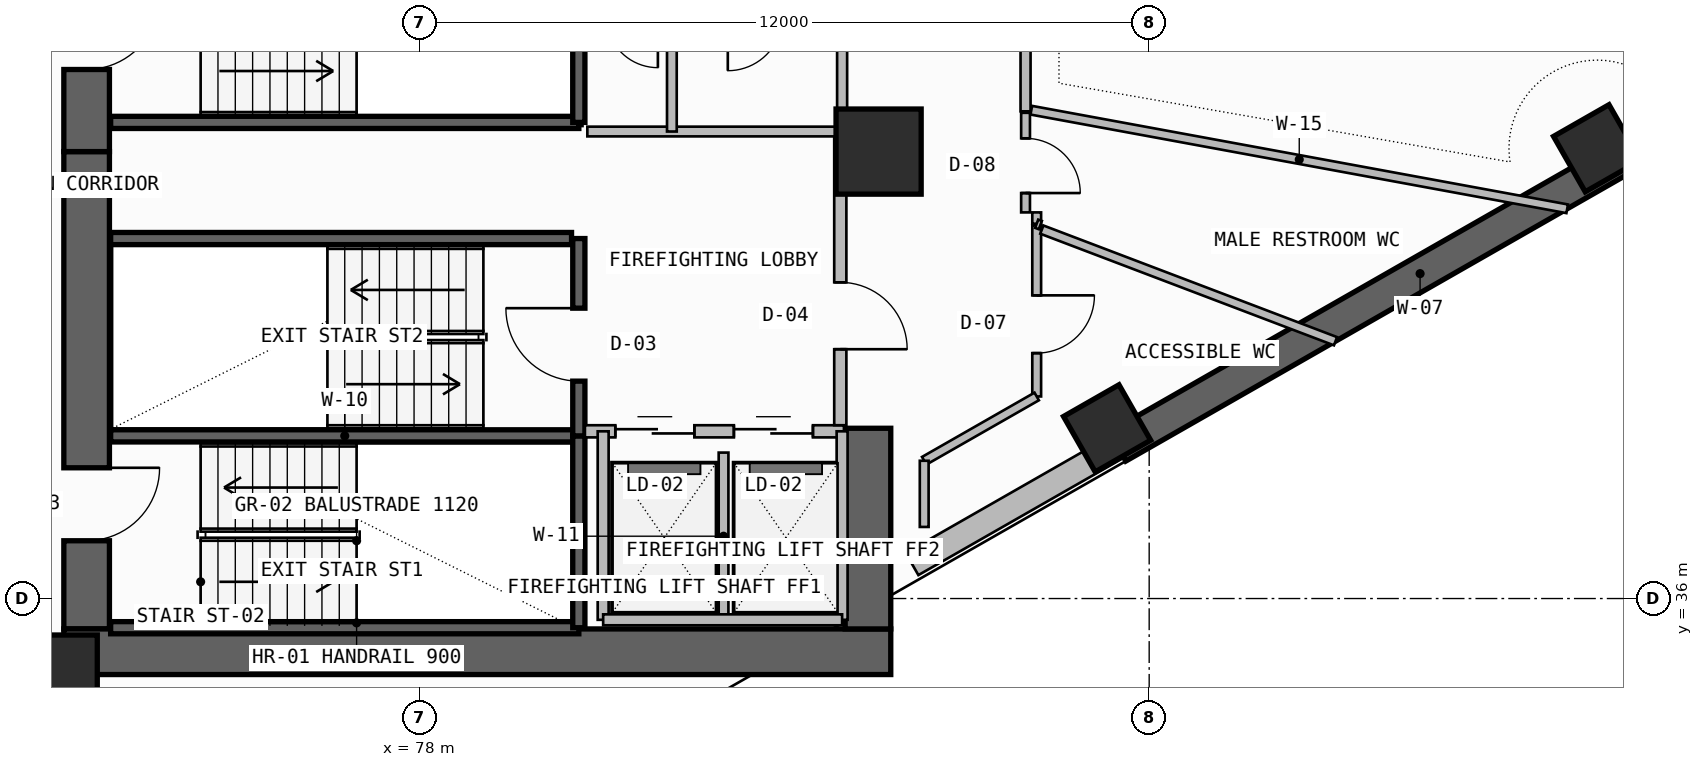
"""IFC4 building model, lengths in metres.
Left out: names, types, materials, properties, quantities, classifications, styles, units other than length and angle.
Written with IfcOpenShell. Run it as: python <this file> out.ifc"""

import sys

from ifc_helpers import new_model, si_unit, direction, frame, frame_2d, origin, origin_2d, place, context, subcontext, project, spatial, rectangle, extrude, element, fill, save


model = new_model("IFC4")
c1 = context("Model", 3, precision=1e-05, world=origin(), true_north=direction((0.0, 1.0)))
c2 = subcontext(c1, "Body", "Model", "MODEL_VIEW")
j1 = project(units=[si_unit("LENGTHUNIT", "METRE"), si_unit("PLANEANGLEUNIT", "RADIAN")], contexts=[c1])
p1 = place(None, origin())
s1 = spatial("IfcSite", under=j1, at=p1, CompositionType="ELEMENT")
p2 = place(p1, origin())
s2 = spatial("IfcBuilding", under=s1, at=p2, CompositionType="ELEMENT")
p3 = place(p2, frame((0.0, 0.0, 225.54)))
s3 = spatial("IfcBuildingStorey", under=s2, at=p3, CompositionType="ELEMENT", Elevation=225.54)
p4 = place(p3, frame((72.525, 35.5, -0.26), z_axis=(0.0, 0.0, 1.0), x_axis=(0.0, 1.0, 0.0)))
e1 = element("IfcWall", 1, at=p4, inside=s3, PredefinedType="SHEAR", context=c2, shape_type="SweptSolid", body=[
    extrude(rectangle(XDim=7.85, YDim=0.75, at=frame_2d((3.925, 0.0))), origin(), (0.0, 0.0, 1.0), 3.52),
])
p5 = place(p4, frame((1.45, 0.0, 0.26)))
e2 = element("IfcOpeningElement", 2, at=p5, cuts=e1, PredefinedType="OPENING", context=c2, shape_type="SweptSolid", body=[
    extrude(rectangle(XDim=1.2, YDim=2.2, at=frame_2d((0.6, 1.1))), frame((0.0, 0.385, 0.0), z_axis=(0.0, -1.0, 0.0), x_axis=(1.0, 0.0, 0.0)), (0.0, 0.0, 1.0), 0.77),
])
p6 = place(p3, frame((72.15, 35.125, -0.26), z_axis=(0.0, 0.0, 1.0), x_axis=(1.0, 0.0, 0.0)))
e3 = element("IfcWall", 3, at=p6, inside=s3, PredefinedType="SHEAR", context=c2, shape_type="SweptSolid", body=[
    extrude(rectangle(XDim=13.6, YDim=0.75, at=frame_2d((6.8, 0.0))), origin(), (0.0, 0.0, 1.0), 3.52),
])
p7 = place(p3, frame((85.375, 35.5, -0.26), z_axis=(0.0, 0.0, 1.0), x_axis=(0.0, 1.0, 0.0)))
e4 = element("IfcWall", 4, at=p7, inside=s3, PredefinedType="SHEAR", context=c2, shape_type="SweptSolid", body=[
    extrude(rectangle(XDim=3.3, YDim=0.75, at=frame_2d((1.65, 0.0))), origin(), (0.0, 0.0, 1.0), 3.52),
])
p8 = place(p3, frame((72.525, 43.35, -0.26), z_axis=(0.0, 0.0, 1.0), x_axis=(0.0, 1.0, 0.0)))
e5 = element("IfcWall", 5, at=p8, inside=s3, PredefinedType="SHEAR", context=c2, shape_type="SweptSolid", body=[
    extrude(rectangle(XDim=12.7, YDim=0.75, at=frame_2d((6.35, 0.0))), origin(), (0.0, 0.0, 1.0), 3.52),
])
p9 = place(p8, frame((1.35, 0.0, 0.26)))
e6 = element("IfcOpeningElement", 6, at=p9, cuts=e5, PredefinedType="OPENING", context=c2, shape_type="SweptSolid", body=[
    extrude(rectangle(XDim=1.2, YDim=2.2, at=frame_2d((0.6, 1.1))), frame((0.0, 0.385, 0.0), z_axis=(0.0, -1.0, 0.0), x_axis=(1.0, 0.0, 0.0)), (0.0, 0.0, 1.0), 0.77),
])
for number, where, z_axis, x_axis in (
    (7, (72.0, 34.7, 0.0), (0.0, 0.0, 1.0), (1.0, 0.0, 0.0)),
    (8, (85.55, 43.35, 0.0), (0.0, 0.0, 1.0), (1.0, 0.0, 0.0)),
):
    element("IfcColumn", number, at=place(p3, frame(where, z_axis=z_axis, x_axis=x_axis)), inside=s3, PredefinedType="COLUMN", context=c2, shape_type="SweptSolid", body=[
        extrude(rectangle(XDim=1.4, YDim=1.4, at=origin_2d()), origin(), (0.0, 0.0, 1.0), 3.52),
    ])
for number, where, z_axis, x_axis in (
    (9, (89.308, 38.799, 0.0), (0.0, 0.0, 1.0), (0.868, 0.496, 0.0)),
    (10, (97.367, 43.405, 0.0), (0.0, 0.0, 1.0), (0.868, 0.496, 0.0)),
):
    element("IfcColumn", number, at=place(p3, frame(where, z_axis=z_axis, x_axis=x_axis)), inside=s3, PredefinedType="COLUMN", context=c2, shape_type="SweptSolid", body=[
        extrude(rectangle(XDim=1.05, YDim=1.05, at=origin_2d()), origin(), (0.0, 0.0, 1.0), 3.52),
    ])
p10 = place(p3, frame((86.1, 36.568, 0.0), z_axis=(0.0, 0.0, 1.0), x_axis=(0.868192956745, 0.496226752461, 0.0)))
e11 = element("IfcWall", 11, at=p10, inside=s3, PredefinedType="SOLIDWALL", context=c2, shape_type="SweptSolid", body=[
    extrude(rectangle(XDim=3.892, YDim=0.42, at=frame_2d((1.946, 0.0))), origin(), (0.0, 0.0, 1.0), 2.245),
])
p11 = place(p3, frame((89.479, 38.499, -0.26), z_axis=(0.0, 0.0, 1.0), x_axis=(0.868197136736, 0.496219439123, 0.0)))
e12 = element("IfcWall", 12, at=p11, inside=s3, PredefinedType="SHEAR", context=c2, shape_type="SweptSolid", body=[
    extrude(rectangle(XDim=17.636, YDim=0.55, at=frame_2d((8.818, 0.0))), origin(), (0.0, 0.0, 1.0), 3.52),
])
p12 = place(p11, frame((11.464, 0.0, 1.1)))
e13 = element("IfcOpeningElement", 13, at=p12, cuts=e12, PredefinedType="OPENING", context=c2, shape_type="SweptSolid", body=[
    extrude(rectangle(XDim=2.4, YDim=1.2, at=frame_2d((1.2, 0.6))), frame((0.0, 0.285, 0.0), z_axis=(0.0, -1.0, 0.0), x_axis=(1.0, 0.0, 0.0)), (0.0, 0.0, 1.0), 0.57),
])
for number, where, z_axis, x_axis in (
    (14, (72.92, 35.52, -0.26), (0.0, 0.0, 1.0), (1.0, 0.0, 0.0)),
    (15, (72.92, 38.675, -0.26), (0.0, 0.0, 1.0), (1.0, 0.0, 0.0)),
):
    element("IfcWall", number, at=place(p3, frame(where, z_axis=z_axis, x_axis=x_axis)), inside=s3, PredefinedType="SOLIDWALL", context=c2, shape_type="SweptSolid", body=[
        extrude(rectangle(XDim=7.7, YDim=0.2, at=frame_2d((3.85, 0.0))), origin(), (0.0, 0.0, 1.0), 3.52),
    ])
p13 = place(p3, frame((80.62, 35.52, -0.26), z_axis=(0.0, 0.0, 1.0), x_axis=(0.0, 1.0, 0.0)))
e16 = element("IfcWall", 16, at=p13, inside=s3, PredefinedType="SOLIDWALL", context=c2, shape_type="SweptSolid", body=[
    extrude(rectangle(XDim=3.155, YDim=0.2, at=frame_2d((1.578, 0.0))), origin(), (0.0, 0.0, 1.0), 3.52),
])
p14 = place(p3, frame((80.62, 38.675, -0.26), z_axis=(0.0, 0.0, 1.0), x_axis=(0.0, 1.0, 0.0)))
e17 = element("IfcWall", 17, at=p14, inside=s3, PredefinedType="SOLIDWALL", context=c2, shape_type="SweptSolid", body=[
    extrude(rectangle(XDim=3.245, YDim=0.2, at=frame_2d((1.623, 0.0))), origin(), (0.0, 0.0, 1.0), 3.52),
])
p15 = place(p14, frame((0.9, 0.0, 0.26)))
e18 = element("IfcOpeningElement", 18, at=p15, cuts=e17, PredefinedType="OPENING", context=c2, shape_type="SweptSolid", body=[
    extrude(rectangle(XDim=1.2, YDim=2.2, at=frame_2d((0.6, 1.1))), frame((0.0, 0.11, 0.0), z_axis=(0.0, -1.0, 0.0), x_axis=(1.0, 0.0, 0.0)), (0.0, 0.0, 1.0), 0.22),
])
p16 = place(p3, frame((80.72, 38.75, 0.0), z_axis=(0.0, 0.0, 1.0), x_axis=(1.0, 0.0, 0.0)))
e19 = element("IfcWall", 19, at=p16, inside=s3, PredefinedType="SOLIDWALL", context=c2, shape_type="SweptSolid", body=[
    extrude(rectangle(XDim=4.26, YDim=0.2, at=frame_2d((2.13, 0.0))), origin(), (0.0, 0.0, 1.0), 3.26),
])
p17 = place(p16, frame((0.5, 0.0, 0.0)))
e20 = element("IfcOpeningElement", 20, at=p17, cuts=e19, PredefinedType="OPENING", context=c2, shape_type="SweptSolid", body=[
    extrude(rectangle(XDim=1.3, YDim=2.3, at=frame_2d((0.65, 1.15))), frame((0.0, 0.11, 0.0), z_axis=(0.0, -1.0, 0.0), x_axis=(1.0, 0.0, 0.0)), (0.0, 0.0, 1.0), 0.22),
])
p18 = place(p16, frame((2.45, 0.0, 0.0)))
e21 = element("IfcOpeningElement", 21, at=p18, cuts=e19, PredefinedType="OPENING", context=c2, shape_type="SweptSolid", body=[
    extrude(rectangle(XDim=1.3, YDim=2.3, at=frame_2d((0.65, 1.15))), frame((0.0, 0.11, 0.0), z_axis=(0.0, -1.0, 0.0), x_axis=(1.0, 0.0, 0.0)), (0.0, 0.0, 1.0), 0.22),
])
p19 = place(p3, frame((83.0, 35.65, 0.0), z_axis=(0.0, 0.0, 1.0), x_axis=(0.0, 1.0, 0.0)))
e22 = element("IfcWall", 22, at=p19, inside=s3, PredefinedType="PLUMBINGWALL", context=c2, shape_type="SweptSolid", body=[
    extrude(rectangle(XDim=2.75, YDim=0.16, at=frame_2d((1.375, 0.0))), origin(), (0.0, 0.0, 1.0), 3.26),
])
for number, where, z_axis, x_axis in (
    (23, (84.95, 35.65, 0.0), (0.0, 0.0, 1.0), (0.0, 1.0, 0.0)),
    (24, (81.02, 35.65, 0.0), (0.0, 0.0, 1.0), (0.0, 1.0, 0.0)),
):
    element("IfcWall", number, at=place(p3, frame(where, z_axis=z_axis, x_axis=x_axis)), inside=s3, PredefinedType="SOLIDWALL", context=c2, shape_type="SweptSolid", body=[
        extrude(rectangle(XDim=3.1, YDim=0.18, at=frame_2d((1.55, 0.0))), origin(), (0.0, 0.0, 1.0), 3.26),
    ])
p20 = place(p3, frame((81.02, 35.65, 0.0), z_axis=(0.0, 0.0, 1.0), x_axis=(1.0, 0.0, 0.0)))
e25 = element("IfcWall", 25, at=p20, inside=s3, PredefinedType="SOLIDWALL", context=c2, shape_type="SweptSolid", body=[
    extrude(rectangle(XDim=3.93, YDim=0.18, at=frame_2d((1.965, 0.0))), origin(), (0.0, 0.0, 1.0), 3.26),
])
p21 = place(p3, frame((84.92, 38.85, 0.0), z_axis=(0.0, 0.0, 1.0), x_axis=(0.0, 1.0, 0.0)))
e26 = element("IfcWall", 26, at=p21, inside=s3, PredefinedType="SOLIDWALL", context=c2, shape_type="SweptSolid", body=[
    extrude(rectangle(XDim=4.83, YDim=0.2, at=frame_2d((2.415, 0.0))), origin(), (0.0, 0.0, 1.0), 3.26),
])
p22 = place(p21, frame((1.25, 0.0, 0.0)))
e27 = element("IfcOpeningElement", 27, at=p22, cuts=e26, PredefinedType="OPENING", context=c2, shape_type="SweptSolid", body=[
    extrude(rectangle(XDim=1.1, YDim=2.2, at=frame_2d((0.55, 1.1))), frame((0.0, 0.11, 0.0), z_axis=(0.0, -1.0, 0.0), x_axis=(1.0, 0.0, 0.0)), (0.0, 0.0, 1.0), 0.22),
])
p23 = place(p3, frame((72.92, 41.92, -0.26), z_axis=(0.0, 0.0, 1.0), x_axis=(1.0, 0.0, 0.0)))
e28 = element("IfcWall", 28, at=p23, inside=s3, PredefinedType="SOLIDWALL", context=c2, shape_type="SweptSolid", body=[
    extrude(rectangle(XDim=7.58, YDim=0.2, at=frame_2d((3.79, 0.0))), origin(), (0.0, 0.0, 1.0), 3.52),
])
p24 = place(p3, frame((72.92, 43.83, -0.26), z_axis=(0.0, 0.0, 1.0), x_axis=(1.0, 0.0, 0.0)))
e29 = element("IfcWall", 29, at=p24, inside=s3, PredefinedType="SOLIDWALL", context=c2, shape_type="SweptSolid", body=[
    extrude(rectangle(XDim=7.7, YDim=0.2, at=frame_2d((3.85, 0.0))), origin(), (0.0, 0.0, 1.0), 3.52),
])
p25 = place(p3, frame((80.62, 43.83, -0.26), z_axis=(0.0, 0.0, 1.0), x_axis=(0.0, 1.0, 0.0)))
e30 = element("IfcWall", 30, at=p25, inside=s3, PredefinedType="SOLIDWALL", context=c2, shape_type="SweptSolid", body=[
    extrude(rectangle(XDim=3.24, YDim=0.2, at=frame_2d((1.62, 0.0))), origin(), (0.0, 0.0, 1.0), 3.52),
])
p26 = place(p3, frame((84.95, 43.68, 0.0), z_axis=(0.0, 0.0, 1.0), x_axis=(0.0, 1.0, 0.0)))
e31 = element("IfcWall", 31, at=p26, inside=s3, PredefinedType="PLUMBINGWALL", context=c2, shape_type="SweptSolid", body=[
    extrude(rectangle(XDim=1.9, YDim=0.165, at=frame_2d((0.95, 0.0))), origin(), (0.0, 0.0, 1.0), 3.26),
])
p27 = place(p3, frame((80.76, 43.68, 0.0), z_axis=(0.0, 0.0, 1.0), x_axis=(1.0, 0.0, 0.0)))
e32 = element("IfcWall", 32, at=p27, inside=s3, PredefinedType="PLUMBINGWALL", context=c2, shape_type="SweptSolid", body=[
    extrude(rectangle(XDim=4.19, YDim=0.16, at=frame_2d((2.095, 0.0))), origin(), (0.0, 0.0, 1.0), 3.26),
])
p28 = place(p3, frame((82.15, 43.68, 0.0), z_axis=(0.0, 0.0, 1.0), x_axis=(0.0, 1.0, 0.0)))
e33 = element("IfcWall", 33, at=p28, inside=s3, PredefinedType="PLUMBINGWALL", context=c2, shape_type="SweptSolid", body=[
    extrude(rectangle(XDim=1.9, YDim=0.16, at=frame_2d((0.95, 0.0))), origin(), (0.0, 0.0, 1.0), 3.26),
])
p29 = place(p3, frame((88.15, 39.323, 0.0), z_axis=(0.0, 0.0, 1.0), x_axis=(0.0, 1.0, 0.0)))
e34 = element("IfcWall", 34, at=p29, inside=s3, PredefinedType="PARTITIONING", context=c2, shape_type="SweptSolid", body=[
    extrude(rectangle(XDim=2.815, YDim=0.145, at=frame_2d((1.407, 0.0))), origin(), (0.0, 0.0, 1.0), 2.745),
])
p30 = place(p29, frame((0.713, 0.0, 0.0)))
e35 = element("IfcOpeningElement", 35, at=p30, cuts=e34, PredefinedType="OPENING", context=c2, shape_type="SweptSolid", body=[
    extrude(rectangle(XDim=0.95, YDim=2.15, at=frame_2d((0.475, 1.075))), frame((0.0, 0.083, 0.0), z_axis=(0.0, -1.0, 0.0), x_axis=(1.0, 0.0, 0.0)), (0.0, 0.0, 1.0), 0.165),
])
p31 = place(p3, frame((86.3, 38.266, 0.0), z_axis=(0.0, 0.0, 1.0), x_axis=(0.868179674817, 0.496249989657, 0.0)))
e36 = element("IfcWall", 36, at=p31, inside=s3, PredefinedType="PARTITIONING", context=c2, shape_type="SweptSolid", body=[
    extrude(rectangle(XDim=2.131, YDim=0.145, at=frame_2d((1.065, 0.0))), origin(), (0.0, 0.0, 1.0), 3.26),
])
p32 = place(p3, frame((88.235, 42.067, 0.0), z_axis=(0.0, 0.0, 1.0), x_axis=(0.934750944103, -0.355303634232, 0.0)))
e37 = element("IfcWall", 37, at=p32, inside=s3, PredefinedType="PARTITIONING", context=c2, shape_type="SweptSolid", body=[
    extrude(rectangle(XDim=5.167, YDim=0.145, at=frame_2d((2.583, 0.0))), origin(), (0.0, 0.0, 1.0), 2.245),
])
p33 = place(p3, frame((87.967, 44.012, 0.0), z_axis=(0.0, 0.0, 1.0), x_axis=(0.0, 1.0, 0.0)))
e38 = element("IfcWall", 38, at=p33, inside=s3, PredefinedType="PARTITIONING", context=c2, shape_type="SweptSolid", body=[
    extrude(rectangle(XDim=1.638, YDim=0.165, at=frame_2d((0.819, 0.0))), origin(), (0.0, 0.0, 1.0), 2.745),
])
p34 = place(p3, frame((96.875, 42.409, 0.0), z_axis=(0.0, 0.0, 1.0), x_axis=(-0.98349773653, 0.180920430689, 0.0)))
e39 = element("IfcWall", 39, at=p34, inside=s3, PredefinedType="PARTITIONING", context=c2, shape_type="SweptSolid", body=[
    extrude(rectangle(XDim=8.962, YDim=0.145, at=frame_2d((4.481, 0.0))), origin(), (0.0, 0.0, 1.0), 2.245),
])
p35 = place(p3, frame((87.967, 42.35, 0.0), z_axis=(0.0, 0.0, 1.0), x_axis=(0.0, 1.0, 0.0)))
e40 = element("IfcWall", 40, at=p35, inside=s3, PredefinedType="PARTITIONING", context=c2, shape_type="SweptSolid", body=[
    extrude(rectangle(XDim=1.638, YDim=0.145, at=frame_2d((0.819, 0.0))), origin(), (0.0, 0.0, 1.0), 2.745),
])
p36 = place(p35, frame((0.318, 0.0, 0.0)))
e41 = element("IfcOpeningElement", 41, at=p36, cuts=e40, PredefinedType="OPENING", context=c2, shape_type="SweptSolid", body=[
    extrude(rectangle(XDim=0.9, YDim=2.1, at=frame_2d((0.45, 1.05))), frame((0.0, 0.083, 0.0), z_axis=(0.0, -1.0, 0.0), x_axis=(1.0, 0.0, 0.0)), (0.0, 0.0, 1.0), 0.165),
])
p37 = place(p3, frame((88.15, 42.163, 0.0), z_axis=(0.0, 0.0, 1.0), x_axis=(0.0, 1.0, 0.0)))
e42 = element("IfcWall", 42, at=p37, inside=s3, PredefinedType="PARTITIONING", context=c2, shape_type="SweptSolid", body=[
    extrude(rectangle(XDim=0.187, YDim=0.145, at=frame_2d((0.093, 0.0))), origin(), (0.0, 0.0, 1.0), 3.26),
])
p38 = place(p3, frame((88.21, 42.141, 0.0), z_axis=(0.0, 0.0, 1.0), x_axis=(-0.93912285212, 0.343581531264, 0.0)))
e43 = element("IfcWall", 43, at=p38, inside=s3, PredefinedType="PARTITIONING", context=c2, shape_type="SweptSolid", body=[
    extrude(rectangle(XDim=0.064, YDim=0.145, at=frame_2d((0.032, 0.0))), origin(), (0.0, 0.0, 1.0), 2.845),
])
p39 = place(p3, frame((86.3, 37.177, 0.0), z_axis=(0.0, 0.0, 1.0), x_axis=(0.0, 1.0, 0.0)))
e44 = element("IfcWall", 44, at=p39, inside=s3, PredefinedType="PARTITIONING", context=c2, shape_type="SweptSolid", body=[
    extrude(rectangle(XDim=1.088, YDim=0.145, at=frame_2d((0.544, 0.0))), origin(), (0.0, 0.0, 1.0), 3.26),
])
p40 = place(p5, frame((1.2, 0.0, 0.0), z_axis=(0.0, 0.0, 1.0), x_axis=(-1.0, 0.0, 0.0)))
e45 = element("IfcDoor", 45, at=p40, inside=s3, OperationType="SINGLE_SWING_LEFT", PredefinedType="USERDEFINED", context=c2, shape_type="SweptSolid", body=[
    extrude(rectangle(XDim=1.2, YDim=2.2, at=frame_2d((0.6, 1.1))), frame((0.0, 0.025, 0.0), z_axis=(0.0, -1.0, 0.0), x_axis=(1.0, 0.0, 0.0)), (0.0, 0.0, 1.0), 0.05),
])
fill(e2, e45)
p41 = place(p15, origin())
e46 = element("IfcDoor", 46, at=p41, inside=s3, OperationType="SINGLE_SWING_RIGHT", PredefinedType="USERDEFINED", context=c2, shape_type="SweptSolid", body=[
    extrude(rectangle(XDim=1.2, YDim=2.2, at=frame_2d((0.6, 1.1))), frame((0.0, 0.025, 0.0), z_axis=(0.0, -1.0, 0.0), x_axis=(1.0, 0.0, 0.0)), (0.0, 0.0, 1.0), 0.05),
])
fill(e18, e46)
p42 = place(p17, origin())
e47 = element("IfcDoor", 47, at=p42, inside=s3, OperationType="DOUBLE_DOOR_SLIDING", PredefinedType="DOOR", context=c2, shape_type="SweptSolid", body=[
    extrude(rectangle(XDim=1.3, YDim=2.3, at=frame_2d((0.65, 1.15))), frame((0.0, 0.025, 0.0), z_axis=(0.0, -1.0, 0.0), x_axis=(1.0, 0.0, 0.0)), (0.0, 0.0, 1.0), 0.05),
])
fill(e20, e47)
p43 = place(p18, origin())
e48 = element("IfcDoor", 48, at=p43, inside=s3, OperationType="DOUBLE_DOOR_SLIDING", PredefinedType="DOOR", context=c2, shape_type="SweptSolid", body=[
    extrude(rectangle(XDim=1.3, YDim=2.3, at=frame_2d((0.65, 1.15))), frame((0.0, 0.025, 0.0), z_axis=(0.0, -1.0, 0.0), x_axis=(1.0, 0.0, 0.0)), (0.0, 0.0, 1.0), 0.05),
])
fill(e21, e48)
p44 = place(p22, frame((1.1, 0.0, 0.0), z_axis=(0.0, 0.0, 1.0), x_axis=(-1.0, 0.0, 0.0)))
e49 = element("IfcDoor", 49, at=p44, inside=s3, OperationType="SINGLE_SWING_RIGHT", PredefinedType="DOOR", context=c2, shape_type="SweptSolid", body=[
    extrude(rectangle(XDim=1.1, YDim=2.2, at=frame_2d((0.55, 1.1))), frame((0.0, 0.025, 0.0), z_axis=(0.0, -1.0, 0.0), x_axis=(1.0, 0.0, 0.0)), (0.0, 0.0, 1.0), 0.05),
])
fill(e27, e49)
p45 = place(p9, frame((1.2, 0.0, 0.0), z_axis=(0.0, 0.0, 1.0), x_axis=(-1.0, 0.0, 0.0)))
e50 = element("IfcDoor", 50, at=p45, inside=s3, OperationType="SINGLE_SWING_LEFT", PredefinedType="USERDEFINED", context=c2, shape_type="SweptSolid", body=[
    extrude(rectangle(XDim=1.2, YDim=2.2, at=frame_2d((0.6, 1.1))), frame((0.0, 0.025, 0.0), z_axis=(0.0, -1.0, 0.0), x_axis=(1.0, 0.0, 0.0)), (0.0, 0.0, 1.0), 0.05),
])
fill(e6, e50)
p46 = place(p30, frame((0.95, 0.0, 0.0), z_axis=(0.0, 0.0, 1.0), x_axis=(-1.0, 0.0, 0.0)))
e51 = element("IfcDoor", 51, at=p46, inside=s3, OperationType="SINGLE_SWING_LEFT", PredefinedType="DOOR", context=c2, shape_type="SweptSolid", body=[
    extrude(rectangle(XDim=0.95, YDim=2.15, at=frame_2d((0.475, 1.075))), frame((0.0, 0.025, 0.0), z_axis=(0.0, -1.0, 0.0), x_axis=(1.0, 0.0, 0.0)), (0.0, 0.0, 1.0), 0.05),
])
fill(e35, e51)
p47 = place(p36, frame((0.9, 0.0, 0.0), z_axis=(0.0, 0.0, 1.0), x_axis=(-1.0, 0.0, 0.0)))
e52 = element("IfcDoor", 52, at=p47, inside=s3, OperationType="SINGLE_SWING_RIGHT", PredefinedType="DOOR", context=c2, shape_type="SweptSolid", body=[
    extrude(rectangle(XDim=0.9, YDim=2.1, at=frame_2d((0.45, 1.05))), frame((0.0, 0.025, 0.0), z_axis=(0.0, -1.0, 0.0), x_axis=(1.0, 0.0, 0.0)), (0.0, 0.0, 1.0), 0.05),
])
fill(e41, e52)
save(model, sys.argv[1])
